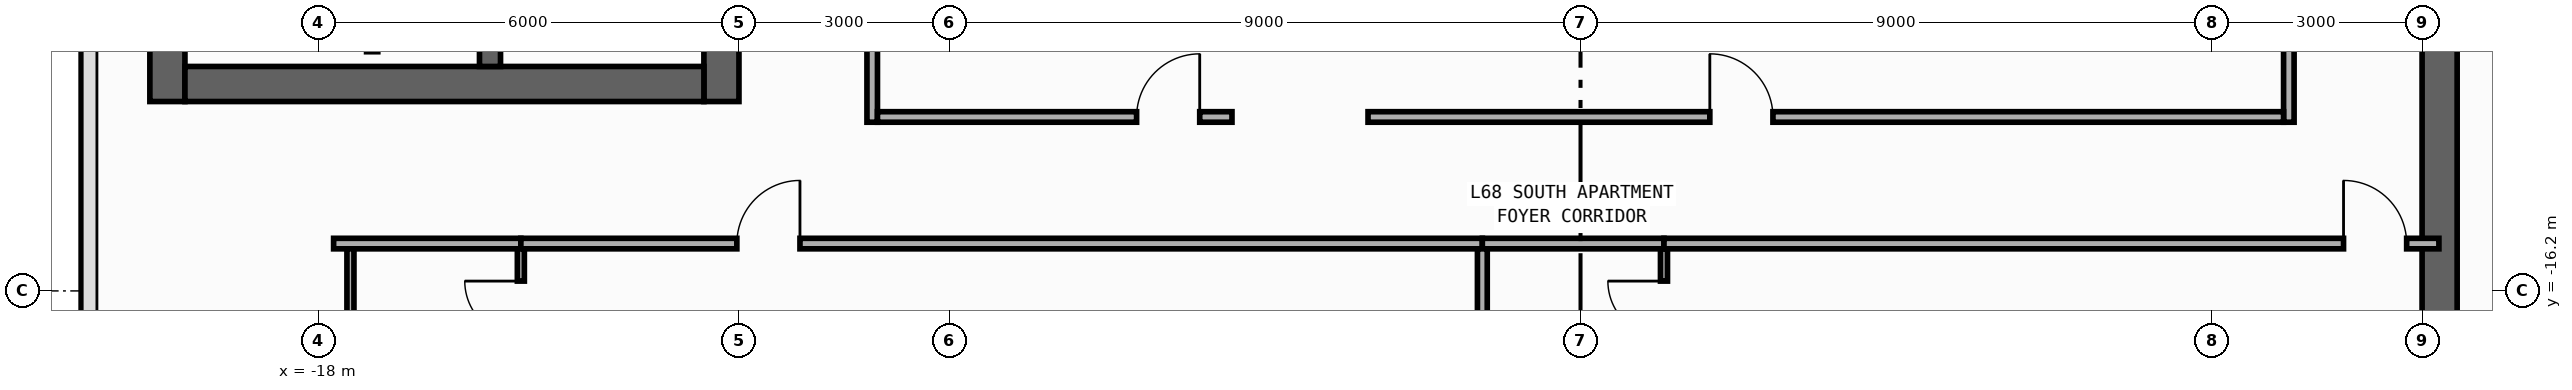
"""IFC4 building model, lengths in metres.
Left out: names, types, materials, properties, quantities, classifications, styles, units other than length and angle.
Written with IfcOpenShell. Run it as: python <this file> out.ifc"""

import sys

from ifc_helpers import new_model, si_unit, direction, frame, frame_2d, origin, place, context, subcontext, project, spatial, rectangle, extrude, element, fill, save


model = new_model("IFC4")
c1 = context("Model", 3, precision=1e-05, world=origin(), true_north=direction((0.0, 1.0)))
c2 = subcontext(c1, "Body", "Model", "MODEL_VIEW")
j1 = project(units=[si_unit("LENGTHUNIT", "METRE"), si_unit("PLANEANGLEUNIT", "RADIAN")], contexts=[c1])
p1 = place(None, origin())
s1 = spatial("IfcSite", under=j1, at=p1, CompositionType="ELEMENT")
p2 = place(p1, origin())
s2 = spatial("IfcBuilding", under=s1, at=p2, CompositionType="ELEMENT")
p3 = place(p2, frame((0.0, 0.0, 285.2)))
s3 = spatial("IfcBuildingStorey", under=s2, at=p3, CompositionType="ELEMENT", Elevation=285.2)
p4 = place(p3, frame((-20.15, -13.5, 0.0), z_axis=(0.0, 0.0, 1.0), x_axis=(0.0, 1.0, 0.0)))
e1 = element("IfcWall", 1, at=p4, inside=s3, PredefinedType="SHEAR", context=c2, shape_type="SweptSolid", body=[
    extrude(rectangle(XDim=27.0, YDim=0.5, at=frame_2d((13.5, 0.0))), origin(), (0.0, 0.0, 1.0), 3.54),
])
p5 = place(p3, frame((-12.25, -13.5, 0.0), z_axis=(0.0, 0.0, 1.0), x_axis=(0.0, 1.0, 0.0)))
e2 = element("IfcWall", 2, at=p5, inside=s3, PredefinedType="SHEAR", context=c2, shape_type="SweptSolid", body=[
    extrude(rectangle(XDim=27.0, YDim=0.5, at=frame_2d((13.5, 0.0))), origin(), (0.0, 0.0, 1.0), 3.54),
])
p6 = place(p5, frame((15.175, 0.0, 0.0)))
e3 = element("IfcOpeningElement", 3, at=p6, cuts=e2, PredefinedType="OPENING", context=c2, shape_type="SweptSolid", body=[
    extrude(rectangle(XDim=0.85, YDim=2.1, at=frame_2d((0.425, 1.05))), frame((0.0, 0.26, 0.0), z_axis=(0.0, -1.0, 0.0), x_axis=(1.0, 0.0, 0.0)), (0.0, 0.0, 1.0), 0.52),
])
p7 = place(p5, frame((21.275, 0.0, 0.0)))
e4 = element("IfcOpeningElement", 4, at=p7, cuts=e2, PredefinedType="OPENING", context=c2, shape_type="SweptSolid", body=[
    extrude(rectangle(XDim=0.85, YDim=2.1, at=frame_2d((0.425, 1.05))), frame((0.0, 0.26, 0.0), z_axis=(0.0, -1.0, 0.0), x_axis=(1.0, 0.0, 0.0)), (0.0, 0.0, 1.0), 0.52),
])
p8 = place(p5, frame((4.275, 0.0, 0.0)))
e5 = element("IfcOpeningElement", 5, at=p8, cuts=e2, PredefinedType="OPENING", context=c2, shape_type="SweptSolid", body=[
    extrude(rectangle(XDim=0.85, YDim=2.1, at=frame_2d((0.425, 1.05))), frame((0.0, 0.26, 0.0), z_axis=(0.0, -1.0, 0.0), x_axis=(1.0, 0.0, 0.0)), (0.0, 0.0, 1.0), 0.52),
])
p9 = place(p5, frame((10.275, 0.0, 0.0)))
e6 = element("IfcOpeningElement", 6, at=p9, cuts=e2, PredefinedType="OPENING", context=c2, shape_type="SweptSolid", body=[
    extrude(rectangle(XDim=0.85, YDim=2.1, at=frame_2d((0.425, 1.05))), frame((0.0, 0.26, 0.0), z_axis=(0.0, -1.0, 0.0), x_axis=(1.0, 0.0, 0.0)), (0.0, 0.0, 1.0), 0.52),
])
p10 = place(p5, frame((12.725, 0.0, 0.0)))
e7 = element("IfcOpeningElement", 7, at=p10, cuts=e2, PredefinedType="OPENING", context=c2, shape_type="SweptSolid", body=[
    extrude(rectangle(XDim=1.15, YDim=2.2, at=frame_2d((0.575, 1.1))), frame((0.0, 0.26, 0.0), z_axis=(0.0, -1.0, 0.0), x_axis=(1.0, 0.0, 0.0)), (0.0, 0.0, 1.0), 0.52),
])
p11 = place(p5, frame((1.625, 0.0, 0.0)))
e8 = element("IfcOpeningElement", 8, at=p11, cuts=e2, PredefinedType="OPENING", context=c2, shape_type="SweptSolid", body=[
    extrude(rectangle(XDim=0.85, YDim=2.1, at=frame_2d((0.425, 1.05))), frame((0.0, 0.26, 0.0), z_axis=(0.0, -1.0, 0.0), x_axis=(1.0, 0.0, 0.0)), (0.0, 0.0, 1.0), 0.52),
])
p12 = place(p3, frame((-19.9, -13.25, 0.0), z_axis=(0.0, 0.0, 1.0), x_axis=(1.0, 0.0, 0.0)))
e9 = element("IfcWall", 9, at=p12, inside=s3, PredefinedType="SHEAR", context=c2, shape_type="SweptSolid", body=[
    extrude(rectangle(XDim=7.4, YDim=0.5, at=frame_2d((3.7, 0.0))), origin(), (0.0, 0.0, 1.0), 3.54),
])
p13 = place(p3, frame((-15.55, -13.0, 0.0), z_axis=(0.0, 0.0, 1.0), x_axis=(0.0, 1.0, 0.0)))
e10 = element("IfcWall", 10, at=p13, inside=s3, PredefinedType="SHEAR", context=c2, shape_type="SweptSolid", body=[
    extrude(rectangle(XDim=26.0, YDim=0.3, at=frame_2d((13.0, 0.0))), origin(), (0.0, 0.0, 1.0), 3.54),
])
p14 = place(p13, frame((12.225, 0.0, 0.0)))
e11 = element("IfcOpeningElement", 11, at=p14, cuts=e10, PredefinedType="OPENING", context=c2, shape_type="SweptSolid", body=[
    extrude(rectangle(XDim=1.15, YDim=2.2, at=frame_2d((0.575, 1.1))), frame((0.0, 0.16, 0.0), z_axis=(0.0, -1.0, 0.0), x_axis=(1.0, 0.0, 0.0)), (0.0, 0.0, 1.0), 0.32),
])
p15 = place(p13, frame((1.125, 0.0, 0.0)))
e12 = element("IfcOpeningElement", 12, at=p15, cuts=e10, PredefinedType="OPENING", context=c2, shape_type="SweptSolid", body=[
    extrude(rectangle(XDim=0.85, YDim=2.1, at=frame_2d((0.425, 1.05))), frame((0.0, 0.16, 0.0), z_axis=(0.0, -1.0, 0.0), x_axis=(1.0, 0.0, 0.0)), (0.0, 0.0, 1.0), 0.32),
])
p16 = place(p3, frame((12.25, -19.8, 0.0), z_axis=(0.0, 0.0, 1.0), x_axis=(0.0, 1.0, 0.0)))
e13 = element("IfcWall", 13, at=p16, inside=s3, PredefinedType="SHEAR", context=c2, shape_type="SweptSolid", body=[
    extrude(rectangle(XDim=27.0, YDim=0.5, at=frame_2d((13.5, 0.0))), origin(), (0.0, 0.0, 1.0), 3.54),
])
p17 = place(p16, frame((23.05, 0.0, 0.0)))
e14 = element("IfcOpeningElement", 14, at=p17, cuts=e13, PredefinedType="OPENING", context=c2, shape_type="SweptSolid", body=[
    extrude(rectangle(XDim=1.1, YDim=2.2, at=frame_2d((0.55, 1.1))), frame((0.0, 0.26, 0.0), z_axis=(0.0, -1.0, 0.0), x_axis=(1.0, 0.0, 0.0)), (0.0, 0.0, 1.0), 0.52),
])
p18 = place(p16, frame((19.85, 0.0, 0.0)))
e15 = element("IfcOpeningElement", 15, at=p18, cuts=e13, PredefinedType="OPENING", context=c2, shape_type="SweptSolid", body=[
    extrude(rectangle(XDim=1.1, YDim=2.2, at=frame_2d((0.55, 1.1))), frame((0.0, 0.26, 0.0), z_axis=(0.0, -1.0, 0.0), x_axis=(1.0, 0.0, 0.0)), (0.0, 0.0, 1.0), 0.52),
])
p19 = place(p16, frame((16.65, 0.0, 0.0)))
e16 = element("IfcOpeningElement", 16, at=p19, cuts=e13, PredefinedType="OPENING", context=c2, shape_type="SweptSolid", body=[
    extrude(rectangle(XDim=1.1, YDim=2.2, at=frame_2d((0.55, 1.1))), frame((0.0, 0.26, 0.0), z_axis=(0.0, -1.0, 0.0), x_axis=(1.0, 0.0, 0.0)), (0.0, 0.0, 1.0), 0.52),
])
p20 = place(p16, frame((7.175, 0.0, 0.0)))
e17 = element("IfcOpeningElement", 17, at=p20, cuts=e13, PredefinedType="OPENING", context=c2, shape_type="SweptSolid", body=[
    extrude(rectangle(XDim=0.85, YDim=2.1, at=frame_2d((0.425, 1.05))), frame((0.0, 0.26, 0.0), z_axis=(0.0, -1.0, 0.0), x_axis=(1.0, 0.0, 0.0)), (0.0, 0.0, 1.0), 0.52),
])
p21 = place(p16, frame((10.375, 0.0, 0.0)))
e18 = element("IfcOpeningElement", 18, at=p21, cuts=e13, PredefinedType="OPENING", context=c2, shape_type="SweptSolid", body=[
    extrude(rectangle(XDim=0.85, YDim=2.1, at=frame_2d((0.425, 1.05))), frame((0.0, 0.26, 0.0), z_axis=(0.0, -1.0, 0.0), x_axis=(1.0, 0.0, 0.0)), (0.0, 0.0, 1.0), 0.52),
])
p22 = place(p16, frame((12.725, 0.0, 0.0)))
e19 = element("IfcOpeningElement", 19, at=p22, cuts=e13, PredefinedType="OPENING", context=c2, shape_type="SweptSolid", body=[
    extrude(rectangle(XDim=1.15, YDim=2.2, at=frame_2d((0.575, 1.1))), frame((0.0, 0.26, 0.0), z_axis=(0.0, -1.0, 0.0), x_axis=(1.0, 0.0, 0.0)), (0.0, 0.0, 1.0), 0.52),
])
p23 = place(p16, frame((25.125, 0.0, 0.0)))
e20 = element("IfcOpeningElement", 20, at=p23, cuts=e13, PredefinedType="OPENING", context=c2, shape_type="SweptSolid", body=[
    extrude(rectangle(XDim=0.85, YDim=2.1, at=frame_2d((0.425, 1.05))), frame((0.0, 0.26, 0.0), z_axis=(0.0, -1.0, 0.0), x_axis=(1.0, 0.0, 0.0)), (0.0, 0.0, 1.0), 0.52),
])
p24 = place(p3, frame((-10.1, -13.795, 0.0), z_axis=(0.0, 0.0, 1.0), x_axis=(0.0, 1.0, 0.0)))
e21 = element("IfcWall", 21, at=p24, inside=s3, PredefinedType="PARTITIONING", context=c2, shape_type="SweptSolid", body=[
    extrude(rectangle(XDim=9.005, YDim=0.15, at=frame_2d((4.502, 0.0))), origin(), (0.0, 0.0, 1.0), 3.54),
])
p25 = place(p24, frame((7.645, 0.0, 0.0)))
e22 = element("IfcOpeningElement", 22, at=p25, cuts=e21, PredefinedType="OPENING", context=c2, shape_type="SweptSolid", body=[
    extrude(rectangle(XDim=0.9, YDim=2.15, at=frame_2d((0.45, 1.075))), frame((0.0, 0.085, 0.0), z_axis=(0.0, -1.0, 0.0), x_axis=(1.0, 0.0, 0.0)), (0.0, 0.0, 1.0), 0.17),
])
p26 = place(p3, frame((10.1, -13.795, 0.0), z_axis=(0.0, 0.0, 1.0), x_axis=(0.0, 1.0, 0.0)))
e23 = element("IfcWall", 23, at=p26, inside=s3, PredefinedType="PARTITIONING", context=c2, shape_type="SweptSolid", body=[
    extrude(rectangle(XDim=6.375, YDim=0.15, at=frame_2d((3.188, 0.0))), origin(), (0.0, 0.0, 1.0), 3.54),
])
p27 = place(p26, frame((5.015, 0.0, 0.0)))
e24 = element("IfcOpeningElement", 24, at=p27, cuts=e23, PredefinedType="OPENING", context=c2, shape_type="SweptSolid", body=[
    extrude(rectangle(XDim=0.9, YDim=2.15, at=frame_2d((0.45, 1.075))), frame((0.0, 0.085, 0.0), z_axis=(0.0, -1.0, 0.0), x_axis=(1.0, 0.0, 0.0)), (0.0, 0.0, 1.0), 0.17),
])
p28 = place(p3, frame((-17.78, -15.525, 0.0), z_axis=(0.0, 0.0, 1.0), x_axis=(1.0, 0.0, 0.0)))
e25 = element("IfcWall", 25, at=p28, inside=s3, PredefinedType="PARTITIONING", context=c2, shape_type="SweptSolid", body=[
    extrude(rectangle(XDim=2.67, YDim=0.15, at=frame_2d((1.335, 0.0))), origin(), (0.0, 0.0, 1.0), 3.54),
])
p29 = place(p3, frame((-15.11, -15.525, 0.0), z_axis=(0.0, 0.0, 1.0), x_axis=(1.0, 0.0, 0.0)))
e26 = element("IfcWall", 26, at=p29, inside=s3, PredefinedType="PARTITIONING", context=c2, shape_type="SweptSolid", body=[
    extrude(rectangle(XDim=13.71, YDim=0.15, at=frame_2d((6.855, 0.0))), origin(), (0.0, 0.0, 1.0), 3.54),
])
p30 = place(p29, frame((3.08, 0.0, 0.0)))
e27 = element("IfcOpeningElement", 27, at=p30, cuts=e26, PredefinedType="OPENING", context=c2, shape_type="SweptSolid", body=[
    extrude(rectangle(XDim=0.9, YDim=2.15, at=frame_2d((0.45, 1.075))), frame((0.0, 0.085, 0.0), z_axis=(0.0, -1.0, 0.0), x_axis=(1.0, 0.0, 0.0)), (0.0, 0.0, 1.0), 0.17),
])
p31 = place(p3, frame((-1.4, -15.525, 0.0), z_axis=(0.0, 0.0, 1.0), x_axis=(1.0, 0.0, 0.0)))
e28 = element("IfcWall", 28, at=p31, inside=s3, PredefinedType="PARTITIONING", context=c2, shape_type="SweptSolid", body=[
    extrude(rectangle(XDim=2.59, YDim=0.15, at=frame_2d((1.295, 0.0))), origin(), (0.0, 0.0, 1.0), 3.54),
])
p32 = place(p3, frame((1.19, -15.525, 0.0), z_axis=(0.0, 0.0, 1.0), x_axis=(1.0, 0.0, 0.0)))
e29 = element("IfcWall", 29, at=p32, inside=s3, PredefinedType="PARTITIONING", context=c2, shape_type="SweptSolid", body=[
    extrude(rectangle(XDim=11.05, YDim=0.15, at=frame_2d((5.525, 0.0))), origin(), (0.0, 0.0, 1.0), 3.54),
])
p33 = place(p32, frame((9.69, 0.0, 0.0)))
e30 = element("IfcOpeningElement", 30, at=p33, cuts=e29, PredefinedType="OPENING", context=c2, shape_type="SweptSolid", body=[
    extrude(rectangle(XDim=0.9, YDim=2.15, at=frame_2d((0.45, 1.075))), frame((0.0, 0.085, 0.0), z_axis=(0.0, -1.0, 0.0), x_axis=(1.0, 0.0, 0.0)), (0.0, 0.0, 1.0), 0.17),
])
p34 = place(p3, frame((-10.025, -13.72, 0.0), z_axis=(0.0, 0.0, 1.0), x_axis=(1.0, 0.0, 0.0)))
e31 = element("IfcWall", 31, at=p34, inside=s3, PredefinedType="PARTITIONING", context=c2, shape_type="SweptSolid", body=[
    extrude(rectangle(XDim=5.055, YDim=0.15, at=frame_2d((2.527, 0.0))), origin(), (0.0, 0.0, 1.0), 3.54),
])
p35 = place(p34, frame((3.695, 0.0, 0.0)))
e32 = element("IfcOpeningElement", 32, at=p35, cuts=e31, PredefinedType="OPENING", context=c2, shape_type="SweptSolid", body=[
    extrude(rectangle(XDim=0.9, YDim=2.15, at=frame_2d((0.45, 1.075))), frame((0.0, 0.085, 0.0), z_axis=(0.0, -1.0, 0.0), x_axis=(1.0, 0.0, 0.0)), (0.0, 0.0, 1.0), 0.17),
])
p36 = place(p3, frame((-3.03, -13.72, 0.0), z_axis=(0.0, 0.0, 1.0), x_axis=(1.0, 0.0, 0.0)))
e33 = element("IfcWall", 33, at=p36, inside=s3, PredefinedType="PARTITIONING", context=c2, shape_type="SweptSolid", body=[
    extrude(rectangle(XDim=13.055, YDim=0.15, at=frame_2d((6.527, 0.0))), origin(), (0.0, 0.0, 1.0), 3.54),
])
p37 = place(p36, frame((4.874, 0.0, 0.0)))
e34 = element("IfcOpeningElement", 34, at=p37, cuts=e33, PredefinedType="OPENING", context=c2, shape_type="SweptSolid", body=[
    extrude(rectangle(XDim=0.9, YDim=2.15, at=frame_2d((0.45, 1.075))), frame((0.0, 0.085, 0.0), z_axis=(0.0, -1.0, 0.0), x_axis=(1.0, 0.0, 0.0)), (0.0, 0.0, 1.0), 0.17),
])
p38 = place(p3, frame((-15.11, -18.1, 0.0), z_axis=(0.0, 0.0, 1.0), x_axis=(0.0, 1.0, 0.0)))
e35 = element("IfcWall", 35, at=p38, inside=s3, PredefinedType="PARTITIONING", context=c2, shape_type="SweptSolid", body=[
    extrude(rectangle(XDim=2.5, YDim=0.1, at=frame_2d((1.25, 0.0))), origin(), (0.0, 0.0, 1.0), 3.54),
])
p39 = place(p38, frame((1.24, 0.0, 0.0)))
e36 = element("IfcOpeningElement", 36, at=p39, cuts=e35, PredefinedType="OPENING", context=c2, shape_type="SweptSolid", body=[
    extrude(rectangle(XDim=0.8, YDim=2.1, at=frame_2d((0.4, 1.05))), frame((0.0, 0.06, 0.0), z_axis=(0.0, -1.0, 0.0), x_axis=(1.0, 0.0, 0.0)), (0.0, 0.0, 1.0), 0.12),
])
p40 = place(p3, frame((-1.4, -18.1, 0.0), z_axis=(0.0, 0.0, 1.0), x_axis=(0.0, 1.0, 0.0)))
e37 = element("IfcWall", 37, at=p40, inside=s3, PredefinedType="PARTITIONING", context=c2, shape_type="SweptSolid", body=[
    extrude(rectangle(XDim=2.5, YDim=0.14, at=frame_2d((1.25, 0.0))), origin(), (0.0, 0.0, 1.0), 3.54),
])
p41 = place(p3, frame((1.19, -18.1, 0.0), z_axis=(0.0, 0.0, 1.0), x_axis=(0.0, 1.0, 0.0)))
e38 = element("IfcWall", 38, at=p41, inside=s3, PredefinedType="PARTITIONING", context=c2, shape_type="SweptSolid", body=[
    extrude(rectangle(XDim=2.5, YDim=0.1, at=frame_2d((1.25, 0.0))), origin(), (0.0, 0.0, 1.0), 3.54),
])
p42 = place(p41, frame((1.24, 0.0, 0.0)))
e39 = element("IfcOpeningElement", 39, at=p42, cuts=e38, PredefinedType="OPENING", context=c2, shape_type="SweptSolid", body=[
    extrude(rectangle(XDim=0.8, YDim=2.1, at=frame_2d((0.4, 1.05))), frame((0.0, 0.06, 0.0), z_axis=(0.0, -1.0, 0.0), x_axis=(1.0, 0.0, 0.0)), (0.0, 0.0, 1.0), 0.12),
])
p43 = place(p3, frame((-17.54, -18.05, 0.0), z_axis=(0.0, 0.0, 1.0), x_axis=(0.0, 1.0, 0.0)))
e40 = element("IfcWall", 40, at=p43, inside=s3, PredefinedType="PARTITIONING", context=c2, shape_type="SweptSolid", body=[
    extrude(rectangle(XDim=2.45, YDim=0.1, at=frame_2d((1.225, 0.0))), origin(), (0.0, 0.0, 1.0), 3.54),
])
p44 = place(p30, origin())
e41 = element("IfcDoor", 41, at=p44, inside=s3, OperationType="SINGLE_SWING_RIGHT", PredefinedType="DOOR", context=c2, shape_type="SweptSolid", body=[
    extrude(rectangle(XDim=0.9, YDim=2.15, at=frame_2d((0.45, 1.075))), frame((0.0, 0.025, 0.0), z_axis=(0.0, -1.0, 0.0), x_axis=(1.0, 0.0, 0.0)), (0.0, 0.0, 1.0), 0.05),
])
fill(e27, e41)
p45 = place(p33, origin())
e42 = element("IfcDoor", 42, at=p45, inside=s3, OperationType="SINGLE_SWING_LEFT", PredefinedType="DOOR", context=c2, shape_type="SweptSolid", body=[
    extrude(rectangle(XDim=0.9, YDim=2.15, at=frame_2d((0.45, 1.075))), frame((0.0, 0.025, 0.0), z_axis=(0.0, -1.0, 0.0), x_axis=(1.0, 0.0, 0.0)), (0.0, 0.0, 1.0), 0.05),
])
fill(e30, e42)
p46 = place(p35, origin())
e43 = element("IfcDoor", 43, at=p46, inside=s3, OperationType="SINGLE_SWING_RIGHT", PredefinedType="DOOR", context=c2, shape_type="SweptSolid", body=[
    extrude(rectangle(XDim=0.9, YDim=2.15, at=frame_2d((0.45, 1.075))), frame((0.0, 0.025, 0.0), z_axis=(0.0, -1.0, 0.0), x_axis=(1.0, 0.0, 0.0)), (0.0, 0.0, 1.0), 0.05),
])
fill(e32, e43)
p47 = place(p37, origin())
e44 = element("IfcDoor", 44, at=p47, inside=s3, OperationType="SINGLE_SWING_LEFT", PredefinedType="DOOR", context=c2, shape_type="SweptSolid", body=[
    extrude(rectangle(XDim=0.9, YDim=2.15, at=frame_2d((0.45, 1.075))), frame((0.0, 0.025, 0.0), z_axis=(0.0, -1.0, 0.0), x_axis=(1.0, 0.0, 0.0)), (0.0, 0.0, 1.0), 0.05),
])
fill(e34, e44)
p48 = place(p39, origin())
e45 = element("IfcDoor", 45, at=p48, inside=s3, OperationType="SINGLE_SWING_RIGHT", PredefinedType="DOOR", context=c2, shape_type="SweptSolid", body=[
    extrude(rectangle(XDim=0.8, YDim=2.1, at=frame_2d((0.4, 1.05))), frame((0.0, 0.025, 0.0), z_axis=(0.0, -1.0, 0.0), x_axis=(1.0, 0.0, 0.0)), (0.0, 0.0, 1.0), 0.05),
])
fill(e36, e45)
p49 = place(p42, origin())
e46 = element("IfcDoor", 46, at=p49, inside=s3, OperationType="SINGLE_SWING_RIGHT", PredefinedType="DOOR", context=c2, shape_type="SweptSolid", body=[
    extrude(rectangle(XDim=0.8, YDim=2.1, at=frame_2d((0.4, 1.05))), frame((0.0, 0.025, 0.0), z_axis=(0.0, -1.0, 0.0), x_axis=(1.0, 0.0, 0.0)), (0.0, 0.0, 1.0), 0.05),
])
fill(e39, e46)
save(model, sys.argv[1])
